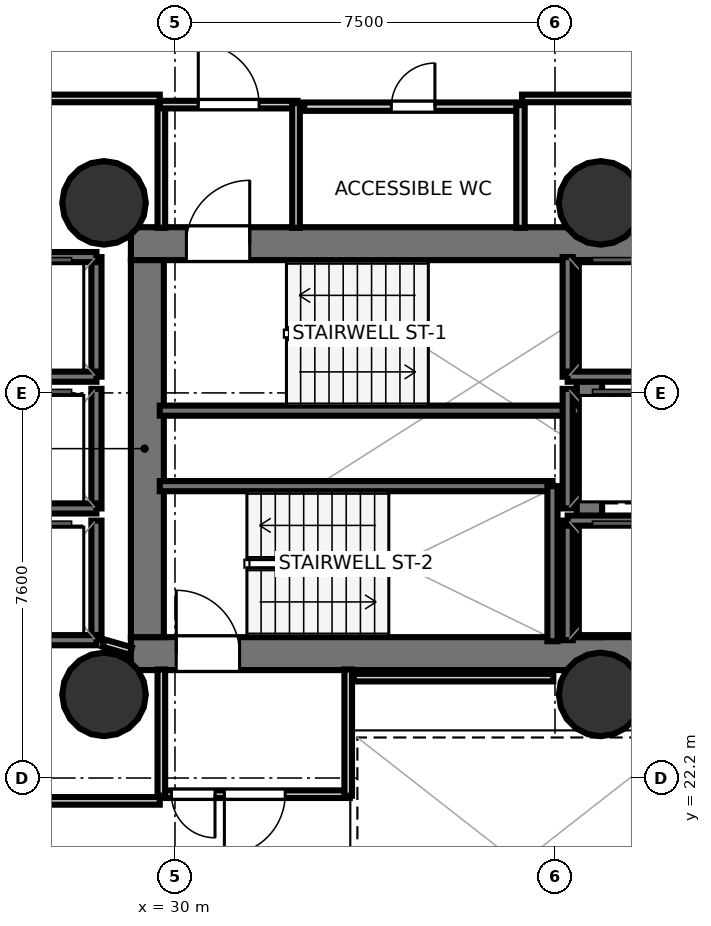
"""IFC4 building model, lengths in metres.
Left out: names, types, materials, properties, quantities, classifications, styles, units other than length and angle.
Written with IfcOpenShell. Run it as: python <this file> out.ifc"""

import sys

from ifc_helpers import new_model, si_unit, direction, frame, frame_2d, origin, origin_2d, place, context, subcontext, project, spatial, rectangle, hollow_circle, extrude, element, fill, save


model = new_model("IFC4")
c1 = context("Model", 3, precision=1e-05, world=origin(), true_north=direction((0.0, 1.0)))
c2 = subcontext(c1, "Body", "Model", "MODEL_VIEW")
j1 = project(units=[si_unit("LENGTHUNIT", "METRE"), si_unit("PLANEANGLEUNIT", "RADIAN")], contexts=[c1])
p1 = place(None, origin())
s1 = spatial("IfcSite", under=j1, at=p1, CompositionType="ELEMENT")
p2 = place(p1, origin())
s2 = spatial("IfcBuilding", under=s1, at=p2, CompositionType="ELEMENT")
p3 = place(p2, frame((0.0, 0.0, 78.4)))
s3 = spatial("IfcBuildingStorey", under=s2, at=p3, CompositionType="ELEMENT", Elevation=78.4)
p4 = place(p3, frame((29.13, 32.745, 0.0), z_axis=(0.0, 0.0, 1.0), x_axis=(1.0, 0.0, 0.0)))
e1 = element("IfcWall", 1, at=p4, inside=s3, PredefinedType="SHEAR", context=c2, shape_type="SweptSolid", body=[
    extrude(rectangle(XDim=10.72, YDim=0.65, at=frame_2d((5.36, 0.0))), origin(), (0.0, 0.0, 1.0), 3.52),
])
p5 = place(p4, frame((1.095, 0.0, 0.0)))
e2 = element("IfcOpeningElement", 2, at=p5, cuts=e1, PredefinedType="OPENING", context=c2, shape_type="SweptSolid", body=[
    extrude(rectangle(XDim=1.25, YDim=2.15, at=frame_2d((0.625, 1.075))), frame((0.0, 0.335, 0.0), z_axis=(0.0, -1.0, 0.0), x_axis=(1.0, 0.0, 0.0)), (0.0, 0.0, 1.0), 0.67),
])
p6 = place(p3, frame((29.13, 24.655, 0.0), z_axis=(0.0, 0.0, 1.0), x_axis=(1.0, 0.0, 0.0)))
e3 = element("IfcWall", 3, at=p6, inside=s3, PredefinedType="SHEAR", context=c2, shape_type="SweptSolid", body=[
    extrude(rectangle(XDim=10.72, YDim=0.65, at=frame_2d((5.36, 0.0))), origin(), (0.0, 0.0, 1.0), 3.52),
])
p7 = place(p6, frame((0.895, 0.0, 0.0)))
e4 = element("IfcOpeningElement", 4, at=p7, cuts=e3, PredefinedType="OPENING", context=c2, shape_type="SweptSolid", body=[
    extrude(rectangle(XDim=1.25, YDim=2.15, at=frame_2d((0.625, 1.075))), frame((0.0, 0.335, 0.0), z_axis=(0.0, -1.0, 0.0), x_axis=(1.0, 0.0, 0.0)), (0.0, 0.0, 1.0), 0.67),
])
p8 = place(p3, frame((29.455, 24.98, 0.0), z_axis=(0.0, 0.0, 1.0), x_axis=(0.0, 1.0, 0.0)))
e5 = element("IfcWall", 5, at=p8, inside=s3, PredefinedType="SHEAR", context=c2, shape_type="SweptSolid", body=[
    extrude(rectangle(XDim=7.44, YDim=0.65, at=frame_2d((3.72, 0.0))), origin(), (0.0, 0.0, 1.0), 3.52),
])
p9 = place(p3, frame((38.18, 24.98, 0.0), z_axis=(0.0, 0.0, 1.0), x_axis=(0.0, 1.0, 0.0)))
e6 = element("IfcWall", 6, at=p9, inside=s3, PredefinedType="SHEAR", context=c2, shape_type="SweptSolid", body=[
    extrude(rectangle(XDim=7.44, YDim=0.5, at=frame_2d((3.72, 0.0))), origin(), (0.0, 0.0, 1.0), 3.52),
])
for number, where, z_axis, x_axis in (
    (7, (28.6, 33.55, 0.0), (0.0, 0.0, 1.0), (1.0, 0.0, 0.0)),
    (8, (28.6, 23.85, 0.0), (0.0, 0.0, 1.0), (1.0, 0.0, 0.0)),
    (9, (38.4, 33.55, 0.0), (0.0, 0.0, 1.0), (1.0, 0.0, 0.0)),
    (10, (38.4, 23.85, 0.0), (0.0, 0.0, 1.0), (1.0, 0.0, 0.0)),
):
    element("IfcColumn", number, at=place(p3, frame(where, z_axis=z_axis, x_axis=x_axis)), inside=s3, PredefinedType="COLUMN", context=c2, shape_type="SweptSolid", body=[
        extrude(hollow_circle(Radius=0.825, WallThickness=0.04, at=origin_2d()), origin(), (0.0, 0.0, 1.0), 3.7),
    ])
p10 = place(p3, frame((29.7, 29.45, 0.0), z_axis=(0.0, 0.0, 1.0), x_axis=(1.0, 0.0, 0.0)))
e11 = element("IfcWall", 11, at=p10, inside=s3, PredefinedType="SOLIDWALL", context=c2, shape_type="SweptSolid", body=[
    extrude(rectangle(XDim=8.3, YDim=0.2, at=frame_2d((4.15, 0.0))), origin(), (0.0, 0.0, 1.0), 3.52),
])
p11 = place(p3, frame((29.7, 27.96, 0.0), z_axis=(0.0, 0.0, 1.0), x_axis=(1.0, 0.0, 0.0)))
e12 = element("IfcWall", 12, at=p11, inside=s3, PredefinedType="SOLIDWALL", context=c2, shape_type="SweptSolid", body=[
    extrude(rectangle(XDim=7.75, YDim=0.2, at=frame_2d((3.875, 0.0))), origin(), (0.0, 0.0, 1.0), 3.52),
])
p12 = place(p3, frame((37.45, 24.9, 0.0), z_axis=(0.0, 0.0, 1.0), x_axis=(0.0, 1.0, 0.0)))
e13 = element("IfcWall", 13, at=p12, inside=s3, PredefinedType="SOLIDWALL", context=c2, shape_type="SweptSolid", body=[
    extrude(rectangle(XDim=3.06, YDim=0.2, at=frame_2d((1.53, 0.0))), origin(), (0.0, 0.0, 1.0), 3.52),
])
p13 = place(p3, frame((37.75, 30.12, 0.0), z_axis=(0.0, 0.0, 1.0), x_axis=(0.0, 1.0, 0.0)))
e14 = element("IfcWall", 14, at=p13, inside=s3, PredefinedType="SOLIDWALL", context=c2, shape_type="SweptSolid", body=[
    extrude(rectangle(XDim=2.36, YDim=0.2, at=frame_2d((1.18, 0.0))), origin(), (0.0, 0.0, 1.0), 3.52),
])
p14 = place(p3, frame((37.75, 30.12, 0.0), z_axis=(0.0, 0.0, 1.0), x_axis=(1.0, 0.0, 0.0)))
e15 = element("IfcWall", 15, at=p14, inside=s3, PredefinedType="SOLIDWALL", context=c2, shape_type="SweptSolid", body=[
    extrude(rectangle(XDim=2.1, YDim=0.2, at=frame_2d((1.05, 0.0))), origin(), (0.0, 0.0, 1.0), 3.52),
])
p15 = place(p3, frame((37.75, 24.92, 0.0), z_axis=(0.0, 0.0, 1.0), x_axis=(0.0, 1.0, 0.0)))
e16 = element("IfcWall", 16, at=p15, inside=s3, PredefinedType="SOLIDWALL", context=c2, shape_type="SweptSolid", body=[
    extrude(rectangle(XDim=2.36, YDim=0.2, at=frame_2d((1.18, 0.0))), origin(), (0.0, 0.0, 1.0), 3.52),
])
p16 = place(p3, frame((37.75, 27.28, 0.0), z_axis=(0.0, 0.0, 1.0), x_axis=(1.0, 0.0, 0.0)))
e17 = element("IfcWall", 17, at=p16, inside=s3, PredefinedType="SOLIDWALL", context=c2, shape_type="SweptSolid", body=[
    extrude(rectangle(XDim=2.1, YDim=0.2, at=frame_2d((1.05, 0.0))), origin(), (0.0, 0.0, 1.0), 3.52),
])
p17 = place(p3, frame((28.45, 30.12, 0.0), z_axis=(0.0, 0.0, 1.0), x_axis=(0.0, 1.0, 0.0)))
e18 = element("IfcWall", 18, at=p17, inside=s3, PredefinedType="SOLIDWALL", context=c2, shape_type="SweptSolid", body=[
    extrude(rectangle(XDim=2.36, YDim=0.2, at=frame_2d((1.18, 0.0))), origin(), (0.0, 0.0, 1.0), 3.52),
])
for number, where, z_axis, x_axis in (
    (19, (26.35, 32.48, 0.0), (0.0, 0.0, 1.0), (1.0, 0.0, 0.0)),
    (20, (26.35, 30.12, 0.0), (0.0, 0.0, 1.0), (1.0, 0.0, 0.0)),
):
    element("IfcWall", number, at=place(p3, frame(where, z_axis=z_axis, x_axis=x_axis)), inside=s3, PredefinedType="SOLIDWALL", context=c2, shape_type="SweptSolid", body=[
        extrude(rectangle(XDim=2.1, YDim=0.2, at=frame_2d((1.05, 0.0))), origin(), (0.0, 0.0, 1.0), 3.52),
    ])
p18 = place(p3, frame((28.45, 27.52, 0.0), z_axis=(0.0, 0.0, 1.0), x_axis=(0.0, 1.0, 0.0)))
e21 = element("IfcWall", 21, at=p18, inside=s3, PredefinedType="SOLIDWALL", context=c2, shape_type="SweptSolid", body=[
    extrude(rectangle(XDim=2.36, YDim=0.2, at=frame_2d((1.18, 0.0))), origin(), (0.0, 0.0, 1.0), 3.52),
])
p19 = place(p3, frame((26.35, 27.52, 0.0), z_axis=(0.0, 0.0, 1.0), x_axis=(1.0, 0.0, 0.0)))
e22 = element("IfcWall", 22, at=p19, inside=s3, PredefinedType="SOLIDWALL", context=c2, shape_type="SweptSolid", body=[
    extrude(rectangle(XDim=2.1, YDim=0.2, at=frame_2d((1.05, 0.0))), origin(), (0.0, 0.0, 1.0), 3.52),
])
p20 = place(p3, frame((28.45, 24.92, 0.0), z_axis=(0.0, 0.0, 1.0), x_axis=(0.0, 1.0, 0.0)))
e23 = element("IfcWall", 23, at=p20, inside=s3, PredefinedType="SOLIDWALL", context=c2, shape_type="SweptSolid", body=[
    extrude(rectangle(XDim=2.36, YDim=0.2, at=frame_2d((1.18, 0.0))), origin(), (0.0, 0.0, 1.0), 3.52),
])
p21 = place(p3, frame((26.35, 24.92, 0.0), z_axis=(0.0, 0.0, 1.0), x_axis=(1.0, 0.0, 0.0)))
e24 = element("IfcWall", 24, at=p21, inside=s3, PredefinedType="SOLIDWALL", context=c2, shape_type="SweptSolid", body=[
    extrude(rectangle(XDim=2.1, YDim=0.2, at=frame_2d((1.05, 0.0))), origin(), (0.0, 0.0, 1.0), 3.52),
])
p22 = place(p3, frame((37.75, 27.52, 0.0), z_axis=(0.0, 0.0, 1.0), x_axis=(0.0, 1.0, 0.0)))
e25 = element("IfcWall", 25, at=p22, inside=s3, PredefinedType="SOLIDWALL", context=c2, shape_type="SweptSolid", body=[
    extrude(rectangle(XDim=2.36, YDim=0.2, at=frame_2d((1.18, 0.0))), origin(), (0.0, 0.0, 1.0), 3.52),
])
p23 = place(p3, frame((29.731, 33.058, 0.0), z_axis=(0.0, 0.0, 1.0), x_axis=(0.0, 1.0, 0.0)))
e26 = element("IfcWall", 26, at=p23, inside=s3, PredefinedType="PARTITIONING", context=c2, shape_type="SweptSolid", body=[
    extrude(rectangle(XDim=2.462, YDim=0.15, at=frame_2d((1.231, 0.0))), origin(), (0.0, 0.0, 1.0), 2.84),
])
p24 = place(p3, frame((29.7, 35.489, 0.0), z_axis=(0.0, 0.0, 1.0), x_axis=(1.0, 0.0, 0.0)))
e27 = element("IfcWall", 27, at=p24, inside=s3, PredefinedType="PARTITIONING", context=c2, shape_type="SweptSolid", body=[
    extrude(rectangle(XDim=2.72, YDim=0.15, at=frame_2d((1.36, 0.0))), origin(), (0.0, 0.0, 1.0), 2.84),
])
p25 = place(p24, frame((0.76, 0.0, 0.0)))
e28 = element("IfcOpeningElement", 28, at=p25, cuts=e27, PredefinedType="OPENING", context=c2, shape_type="SweptSolid", body=[
    extrude(rectangle(XDim=1.2, YDim=2.15, at=frame_2d((0.6, 1.075))), frame((0.0, 0.085, 0.0), z_axis=(0.0, -1.0, 0.0), x_axis=(1.0, 0.0, 0.0)), (0.0, 0.0, 1.0), 0.17),
])
p26 = place(p3, frame((32.389, 35.52, 0.0), z_axis=(0.0, 0.0, 1.0), x_axis=(0.0, -1.0, 0.0)))
e29 = element("IfcWall", 29, at=p26, inside=s3, PredefinedType="PARTITIONING", context=c2, shape_type="SweptSolid", body=[
    extrude(rectangle(XDim=2.462, YDim=0.15, at=frame_2d((1.231, 0.0))), origin(), (0.0, 0.0, 1.0), 2.84),
])
p27 = place(p3, frame((33.45, 21.881, 0.0), z_axis=(0.0, 0.0, 1.0), x_axis=(-1.0, 0.0, 0.0)))
e30 = element("IfcWall", 30, at=p27, inside=s3, PredefinedType="PARTITIONING", context=c2, shape_type="SweptSolid", body=[
    extrude(rectangle(XDim=3.75, YDim=0.15, at=frame_2d((1.875, 0.0))), origin(), (0.0, 0.0, 1.0), 2.84),
])
p28 = place(p27, frame((1.275, 0.0, 0.0)))
e31 = element("IfcOpeningElement", 31, at=p28, cuts=e30, PredefinedType="OPENING", context=c2, shape_type="SweptSolid", body=[
    extrude(rectangle(XDim=1.2, YDim=2.15, at=frame_2d((0.6, 1.075))), frame((0.0, 0.085, 0.0), z_axis=(0.0, -1.0, 0.0), x_axis=(1.0, 0.0, 0.0)), (0.0, 0.0, 1.0), 0.17),
])
p29 = place(p27, frame((2.66, 0.0, 0.0)))
e32 = element("IfcOpeningElement", 32, at=p29, cuts=e30, PredefinedType="OPENING", context=c2, shape_type="SweptSolid", body=[
    extrude(rectangle(XDim=0.86, YDim=2.05, at=frame_2d((0.43, 1.025))), frame((0.0, 0.085, 0.0), z_axis=(0.0, -1.0, 0.0), x_axis=(1.0, 0.0, 0.0)), (0.0, 0.0, 1.0), 0.17),
])
for number, where, z_axis, x_axis in (
    (33, (29.731, 21.85, 0.0), (0.0, 0.0, 1.0), (0.0, 1.0, 0.0)),
    (34, (33.419, 24.342, 0.0), (0.0, 0.0, 1.0), (0.0, -1.0, 0.0)),
):
    element("IfcWall", number, at=place(p3, frame(where, z_axis=z_axis, x_axis=x_axis)), inside=s3, PredefinedType="PARTITIONING", context=c2, shape_type="SweptSolid", body=[
        extrude(rectangle(XDim=2.492, YDim=0.15, at=frame_2d((1.246, 0.0))), origin(), (0.0, 0.0, 1.0), 2.84),
    ])
p30 = place(p3, frame((32.55, 35.449, 0.0), z_axis=(0.0, 0.0, 1.0), x_axis=(1.0, 0.0, 0.0)))
e35 = element("IfcWall", 35, at=p30, inside=s3, PredefinedType="PLUMBINGWALL", context=c2, shape_type="SweptSolid", body=[
    extrude(rectangle(XDim=4.3, YDim=0.165, at=frame_2d((2.15, 0.0))), origin(), (0.0, 0.0, 1.0), 2.84),
])
p31 = place(p30, frame((1.72, 0.0, 0.0)))
e36 = element("IfcOpeningElement", 36, at=p31, cuts=e35, PredefinedType="OPENING", context=c2, shape_type="SweptSolid", body=[
    extrude(rectangle(XDim=0.86, YDim=2.05, at=frame_2d((0.43, 1.025))), frame((0.0, 0.093, 0.0), z_axis=(0.0, -1.0, 0.0), x_axis=(1.0, 0.0, 0.0)), (0.0, 0.0, 1.0), 0.185),
])
p32 = place(p3, frame((36.819, 35.48, 0.0), z_axis=(0.0, 0.0, 1.0), x_axis=(0.0, -1.0, 0.0)))
e37 = element("IfcWall", 37, at=p32, inside=s3, PredefinedType="PLUMBINGWALL", context=c2, shape_type="SweptSolid", body=[
    extrude(rectangle(XDim=2.422, YDim=0.165, at=frame_2d((1.211, 0.0))), origin(), (0.0, 0.0, 1.0), 2.84),
])
p33 = place(p3, frame((29.13, 24.706, 0.0), z_axis=(0.0, 0.0, 1.0), x_axis=(-0.960451214223, 0.278448316742, 0.0)))
e38 = element("IfcWall", 38, at=p33, inside=s3, PredefinedType="PARTITIONING", context=c2, shape_type="SweptSolid", body=[
    extrude(rectangle(XDim=0.562, YDim=0.15, at=frame_2d((0.281, 0.0))), origin(), (0.0, 0.0, 1.0), 2.84),
])
p34 = place(p3, frame((37.467, 24.181, 0.0), z_axis=(0.0, 0.0, 1.0), x_axis=(-1.0, 0.0, 0.0)))
e39 = element("IfcWall", 39, at=p34, inside=s3, PredefinedType="PARTITIONING", context=c2, shape_type="SweptSolid", body=[
    extrude(rectangle(XDim=3.937, YDim=0.15, at=frame_2d((1.968, 0.0))), origin(), (0.0, 0.0, 1.0), 2.84),
])
p35 = place(p3, frame((39.818, 35.611, 0.0), z_axis=(0.0, 0.0, 1.0), x_axis=(-1.0, 0.0, 0.0)))
e40 = element("IfcWall", 40, at=p35, inside=s3, PredefinedType="PARTITIONING", context=c2, shape_type="SweptSolid", body=[
    extrude(rectangle(XDim=2.968, YDim=0.15, at=frame_2d((1.484, 0.0))), origin(), (0.0, 0.0, 1.0), 2.84),
])
p36 = place(p3, frame((29.7, 35.611, 0.0), z_axis=(0.0, 0.0, 1.0), x_axis=(-1.0, 0.0, 0.0)))
e41 = element("IfcWall", 41, at=p36, inside=s3, PredefinedType="PARTITIONING", context=c2, shape_type="SweptSolid", body=[
    extrude(rectangle(XDim=3.28, YDim=0.15, at=frame_2d((1.64, 0.0))), origin(), (0.0, 0.0, 1.0), 2.798),
])
p37 = place(p3, frame((26.42, 21.749, 0.0), z_axis=(0.0, 0.0, 1.0), x_axis=(1.0, 0.0, 0.0)))
e42 = element("IfcWall", 42, at=p37, inside=s3, PredefinedType="PARTITIONING", context=c2, shape_type="SweptSolid", body=[
    extrude(rectangle(XDim=3.28, YDim=0.15, at=frame_2d((1.64, 0.0))), origin(), (0.0, 0.0, 1.0), 2.84),
])
p38 = place(p5, origin())
e43 = element("IfcDoor", 43, at=p38, inside=s3, OperationType="SINGLE_SWING_RIGHT", PredefinedType="DOOR", context=c2, shape_type="SweptSolid", body=[
    extrude(rectangle(XDim=1.25, YDim=2.15, at=frame_2d((0.625, 1.075))), frame((0.0, 0.025, 0.0), z_axis=(0.0, -1.0, 0.0), x_axis=(1.0, 0.0, 0.0)), (0.0, 0.0, 1.0), 0.05),
])
fill(e2, e43)
p39 = place(p7, origin())
e44 = element("IfcDoor", 44, at=p39, inside=s3, OperationType="SINGLE_SWING_LEFT", PredefinedType="DOOR", context=c2, shape_type="SweptSolid", body=[
    extrude(rectangle(XDim=1.25, YDim=2.15, at=frame_2d((0.625, 1.075))), frame((0.0, 0.025, 0.0), z_axis=(0.0, -1.0, 0.0), x_axis=(1.0, 0.0, 0.0)), (0.0, 0.0, 1.0), 0.05),
])
fill(e4, e44)
p40 = place(p25, origin())
e45 = element("IfcDoor", 45, at=p40, inside=s3, OperationType="SINGLE_SWING_LEFT", PredefinedType="DOOR", context=c2, shape_type="SweptSolid", body=[
    extrude(rectangle(XDim=1.2, YDim=2.15, at=frame_2d((0.6, 1.075))), frame((0.0, 0.025, 0.0), z_axis=(0.0, -1.0, 0.0), x_axis=(1.0, 0.0, 0.0)), (0.0, 0.0, 1.0), 0.05),
])
fill(e28, e45)
p41 = place(p28, origin())
e46 = element("IfcDoor", 46, at=p41, inside=s3, OperationType="SINGLE_SWING_RIGHT", PredefinedType="DOOR", context=c2, shape_type="SweptSolid", body=[
    extrude(rectangle(XDim=1.2, YDim=2.15, at=frame_2d((0.6, 1.075))), frame((0.0, 0.025, 0.0), z_axis=(0.0, -1.0, 0.0), x_axis=(1.0, 0.0, 0.0)), (0.0, 0.0, 1.0), 0.05),
])
fill(e31, e46)
p42 = place(p31, origin())
e47 = element("IfcDoor", 47, at=p42, inside=s3, OperationType="SINGLE_SWING_RIGHT", PredefinedType="DOOR", context=c2, shape_type="SweptSolid", body=[
    extrude(rectangle(XDim=0.86, YDim=2.05, at=frame_2d((0.43, 1.025))), frame((0.0, 0.025, 0.0), z_axis=(0.0, -1.0, 0.0), x_axis=(1.0, 0.0, 0.0)), (0.0, 0.0, 1.0), 0.05),
])
fill(e36, e47)
p43 = place(p29, origin())
e48 = element("IfcDoor", 48, at=p43, inside=s3, OperationType="SINGLE_SWING_LEFT", PredefinedType="DOOR", context=c2, shape_type="SweptSolid", body=[
    extrude(rectangle(XDim=0.86, YDim=2.05, at=frame_2d((0.43, 1.025))), frame((0.0, 0.025, 0.0), z_axis=(0.0, -1.0, 0.0), x_axis=(1.0, 0.0, 0.0)), (0.0, 0.0, 1.0), 0.05),
])
fill(e32, e48)
save(model, sys.argv[1])
